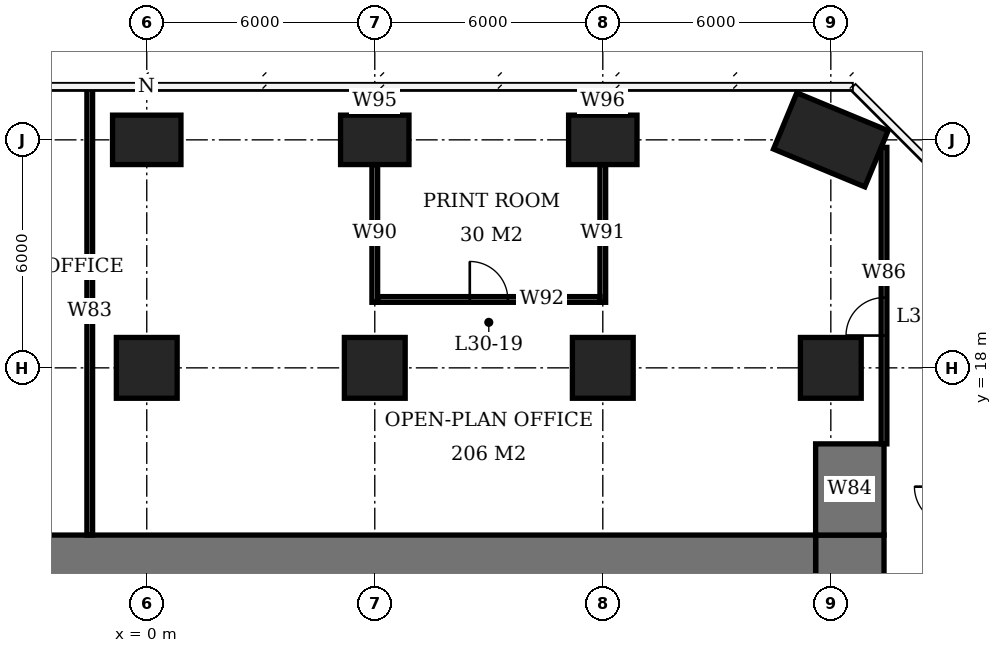
"""IFC4 building model, lengths in metres.
Left out: names, types, materials, properties, quantities, classifications, styles, units other than length and angle.
Written with IfcOpenShell. Run it as: python <this file> out.ifc"""

import sys

from ifc_helpers import new_model, si_unit, direction, frame, frame_2d, origin, origin_2d, place, context, subcontext, project, spatial, rectangle, extrude, element, fill, save


model = new_model("IFC4")
c1 = context("Model", 3, precision=1e-05, world=origin(), true_north=direction((0.0, 1.0)))
c2 = subcontext(c1, "Body", "Model", "MODEL_VIEW")
j1 = project(units=[si_unit("LENGTHUNIT", "METRE"), si_unit("PLANEANGLEUNIT", "RADIAN")], contexts=[c1])
p1 = place(None, origin())
s1 = spatial("IfcSite", under=j1, at=p1, CompositionType="ELEMENT")
p2 = place(p1, origin())
s2 = spatial("IfcBuilding", under=s1, at=p2, CompositionType="ELEMENT")
p3 = place(p2, frame((0.0, 0.0, 125.0)))
s3 = spatial("IfcBuildingStorey", under=s2, at=p3, CompositionType="ELEMENT", Elevation=125.0)
p4 = place(p3, frame((0.0, 18.0, 0.0), z_axis=(0.0, 0.0, 1.0), x_axis=(1.0, 0.0, 0.0)))
e1 = element("IfcColumn", 1, at=p4, inside=s3, PredefinedType="COLUMN", context=c2, shape_type="SweptSolid", body=[
    extrude(rectangle(XDim=1.6, YDim=1.6, at=origin_2d()), origin(), (0.0, 0.0, 1.0), 3.9),
])
p5 = place(p3, frame((0.0, 24.0, 0.0), z_axis=(0.0, 0.0, 1.0), x_axis=(1.0, 0.0, 0.0)))
e2 = element("IfcColumn", 2, at=p5, inside=s3, PredefinedType="COLUMN", context=c2, shape_type="SweptSolid", body=[
    extrude(rectangle(XDim=1.8, YDim=1.3, at=origin_2d()), origin(), (0.0, 0.0, 1.0), 3.9),
])
p6 = place(p3, frame((6.0, 18.0, 0.0), z_axis=(0.0, 0.0, 1.0), x_axis=(1.0, 0.0, 0.0)))
e3 = element("IfcColumn", 3, at=p6, inside=s3, PredefinedType="COLUMN", context=c2, shape_type="SweptSolid", body=[
    extrude(rectangle(XDim=1.6, YDim=1.6, at=origin_2d()), origin(), (0.0, 0.0, 1.0), 3.9),
])
p7 = place(p3, frame((6.0, 24.0, 0.0), z_axis=(0.0, 0.0, 1.0), x_axis=(1.0, 0.0, 0.0)))
e4 = element("IfcColumn", 4, at=p7, inside=s3, PredefinedType="COLUMN", context=c2, shape_type="SweptSolid", body=[
    extrude(rectangle(XDim=1.8, YDim=1.3, at=origin_2d()), origin(), (0.0, 0.0, 1.0), 3.9),
])
p8 = place(p3, frame((12.0, 18.0, 0.0), z_axis=(0.0, 0.0, 1.0), x_axis=(1.0, 0.0, 0.0)))
e5 = element("IfcColumn", 5, at=p8, inside=s3, PredefinedType="COLUMN", context=c2, shape_type="SweptSolid", body=[
    extrude(rectangle(XDim=1.6, YDim=1.6, at=origin_2d()), origin(), (0.0, 0.0, 1.0), 3.9),
])
p9 = place(p3, frame((12.0, 24.0, 0.0), z_axis=(0.0, 0.0, 1.0), x_axis=(1.0, 0.0, 0.0)))
e6 = element("IfcColumn", 6, at=p9, inside=s3, PredefinedType="COLUMN", context=c2, shape_type="SweptSolid", body=[
    extrude(rectangle(XDim=1.8, YDim=1.3, at=origin_2d()), origin(), (0.0, 0.0, 1.0), 3.9),
])
p10 = place(p3, frame((18.0, 18.0, 0.0), z_axis=(0.0, 0.0, 1.0), x_axis=(1.0, 0.0, 0.0)))
e7 = element("IfcColumn", 7, at=p10, inside=s3, PredefinedType="COLUMN", context=c2, shape_type="SweptSolid", body=[
    extrude(rectangle(XDim=1.6, YDim=1.6, at=origin_2d()), origin(), (0.0, 0.0, 1.0), 3.9),
])
p11 = place(p3, frame((18.0, 24.0, 0.0), z_axis=(0.0, 0.0, 1.0), x_axis=(0.923879532511, -0.382683432365, 0.0)))
e8 = element("IfcColumn", 8, at=p11, inside=s3, PredefinedType="COLUMN", context=c2, shape_type="SweptSolid", body=[
    extrude(rectangle(XDim=2.6, YDim=1.6, at=origin_2d()), origin(), (0.0, 0.0, 1.0), 3.9),
])
p12 = place(p3, frame((-5.6, 12.6, 0.0), z_axis=(0.0, 0.0, 1.0), x_axis=(1.0, 0.0, 0.0)))
e9 = element("IfcWall", 9, at=p12, inside=s3, PredefinedType="SHEAR", context=c2, shape_type="SweptSolid", body=[
    extrude(rectangle(XDim=23.2, YDim=2.0, at=frame_2d((11.6, 0.0))), origin(), (0.0, 0.0, 1.0), 3.9),
])
p13 = place(p3, frame((18.5, -7.6, 0.0), z_axis=(0.0, 0.0, 1.0), x_axis=(0.0, 1.0, 0.0)))
e10 = element("IfcWall", 10, at=p13, inside=s3, PredefinedType="SHEAR", context=c2, shape_type="SweptSolid", body=[
    extrude(rectangle(XDim=21.2, YDim=1.8, at=frame_2d((10.6, 0.0))), origin(), (0.0, 0.0, 1.0), 3.9),
])
p14 = place(p13, frame((9.2, 0.0, 0.0)))
e11 = element("IfcOpeningElement", 11, at=p14, cuts=e10, PredefinedType="OPENING", context=c2, shape_type="SweptSolid", body=[
    extrude(rectangle(XDim=1.8, YDim=2.4, at=frame_2d((0.9, 1.2))), frame((0.0, 0.91, 0.0), z_axis=(0.0, -1.0, 0.0), x_axis=(1.0, 0.0, 0.0)), (0.0, 0.0, 1.0), 1.82),
])
p15 = place(p3, frame((18.5, 13.6, 0.0), z_axis=(0.0, 0.0, 1.0), x_axis=(0.0, 1.0, 0.0)))
e12 = element("IfcWall", 12, at=p15, inside=s3, PredefinedType="SHEAR", context=c2, shape_type="SweptSolid", body=[
    extrude(rectangle(XDim=2.4, YDim=1.8, at=frame_2d((1.2, 0.0))), origin(), (0.0, 0.0, 1.0), 3.9),
])
p16 = place(p3, frame((6.075, 19.8, 0.0), z_axis=(0.0, 0.0, 1.0), x_axis=(1.0, 0.0, 0.0)))
e13 = element("IfcWall", 13, at=p16, inside=s3, PredefinedType="PARTITIONING", context=c2, shape_type="SweptSolid", body=[
    extrude(rectangle(XDim=5.85, YDim=0.15, at=frame_2d((2.925, 0.0))), origin(), (0.0, 0.0, 1.0), 3.65),
])
p17 = place(p16, frame((2.425, 0.0, 0.0)))
e14 = element("IfcOpeningElement", 14, at=p17, cuts=e13, PredefinedType="OPENING", context=c2, shape_type="SweptSolid", body=[
    extrude(rectangle(XDim=1.0, YDim=2.1, at=frame_2d((0.5, 1.05))), frame((0.0, 0.085, 0.0), z_axis=(0.0, -1.0, 0.0), x_axis=(1.0, 0.0, 0.0)), (0.0, 0.0, 1.0), 0.17),
])
p18 = place(p3, frame((6.0, 19.725, 0.0), z_axis=(0.0, 0.0, 1.0), x_axis=(0.0, 1.0, 0.0)))
e15 = element("IfcWall", 15, at=p18, inside=s3, PredefinedType="PARTITIONING", context=c2, shape_type="SweptSolid", body=[
    extrude(rectangle(XDim=3.625, YDim=0.15, at=frame_2d((1.812, 0.0))), origin(), (0.0, 0.0, 1.0), 3.65),
])
p19 = place(p3, frame((6.0, 24.65, 0.0), z_axis=(0.0, 0.0, 1.0), x_axis=(0.0, 1.0, 0.0)))
e16 = element("IfcWall", 16, at=p19, inside=s3, PredefinedType="PARTITIONING", context=c2, shape_type="SweptSolid", body=[
    extrude(rectangle(XDim=0.75, YDim=0.15, at=frame_2d((0.375, 0.0))), origin(), (0.0, 0.0, 1.0), 3.65),
])
p20 = place(p3, frame((12.0, 19.725, 0.0), z_axis=(0.0, 0.0, 1.0), x_axis=(0.0, 1.0, 0.0)))
e17 = element("IfcWall", 17, at=p20, inside=s3, PredefinedType="PARTITIONING", context=c2, shape_type="SweptSolid", body=[
    extrude(rectangle(XDim=3.625, YDim=0.15, at=frame_2d((1.812, 0.0))), origin(), (0.0, 0.0, 1.0), 3.65),
])
p21 = place(p3, frame((12.0, 24.65, 0.0), z_axis=(0.0, 0.0, 1.0), x_axis=(0.0, 1.0, 0.0)))
e18 = element("IfcWall", 18, at=p21, inside=s3, PredefinedType="PARTITIONING", context=c2, shape_type="SweptSolid", body=[
    extrude(rectangle(XDim=0.75, YDim=0.15, at=frame_2d((0.375, 0.0))), origin(), (0.0, 0.0, 1.0), 3.65),
])
p22 = place(p3, frame((-1.5, 13.6, 0.0), z_axis=(0.0, 0.0, 1.0), x_axis=(0.0, 1.0, 0.0)))
e19 = element("IfcWall", 19, at=p22, inside=s3, PredefinedType="PARTITIONING", context=c2, shape_type="SweptSolid", body=[
    extrude(rectangle(XDim=11.8, YDim=0.15, at=frame_2d((5.9, 0.0))), origin(), (0.0, 0.0, 1.0), 3.65),
])
p23 = place(p3, frame((19.4, 16.0, 0.0), z_axis=(0.0, 0.0, 1.0), x_axis=(0.0, 1.0, 0.0)))
e20 = element("IfcWall", 20, at=p23, inside=s3, PredefinedType="PARTITIONING", context=c2, shape_type="SweptSolid", body=[
    extrude(rectangle(XDim=7.802, YDim=0.15, at=frame_2d((3.901, 0.0))), origin(), (0.0, 0.0, 1.0), 3.65),
])
p24 = place(p23, frame((2.85, 0.0, 0.0)))
e21 = element("IfcOpeningElement", 21, at=p24, cuts=e20, PredefinedType="OPENING", context=c2, shape_type="SweptSolid", body=[
    extrude(rectangle(XDim=1.0, YDim=2.1, at=frame_2d((0.5, 1.05))), frame((0.0, 0.085, 0.0), z_axis=(0.0, -1.0, 0.0), x_axis=(1.0, 0.0, 0.0)), (0.0, 0.0, 1.0), 0.17),
])
p25 = place(p17, origin())
e22 = element("IfcDoor", 22, at=p25, inside=s3, OperationType="SINGLE_SWING_LEFT", PredefinedType="DOOR", context=c2, shape_type="SweptSolid", body=[
    extrude(rectangle(XDim=1.0, YDim=2.1, at=frame_2d((0.5, 1.05))), frame((0.0, 0.025, 0.0), z_axis=(0.0, -1.0, 0.0), x_axis=(1.0, 0.0, 0.0)), (0.0, 0.0, 1.0), 0.05),
])
fill(e14, e22)
p26 = place(p24, origin())
e23 = element("IfcDoor", 23, at=p26, inside=s3, OperationType="SINGLE_SWING_LEFT", PredefinedType="DOOR", context=c2, shape_type="SweptSolid", body=[
    extrude(rectangle(XDim=1.0, YDim=2.1, at=frame_2d((0.5, 1.05))), frame((0.0, 0.025, 0.0), z_axis=(0.0, -1.0, 0.0), x_axis=(1.0, 0.0, 0.0)), (0.0, 0.0, 1.0), 0.05),
])
fill(e21, e23)
save(model, sys.argv[1])
